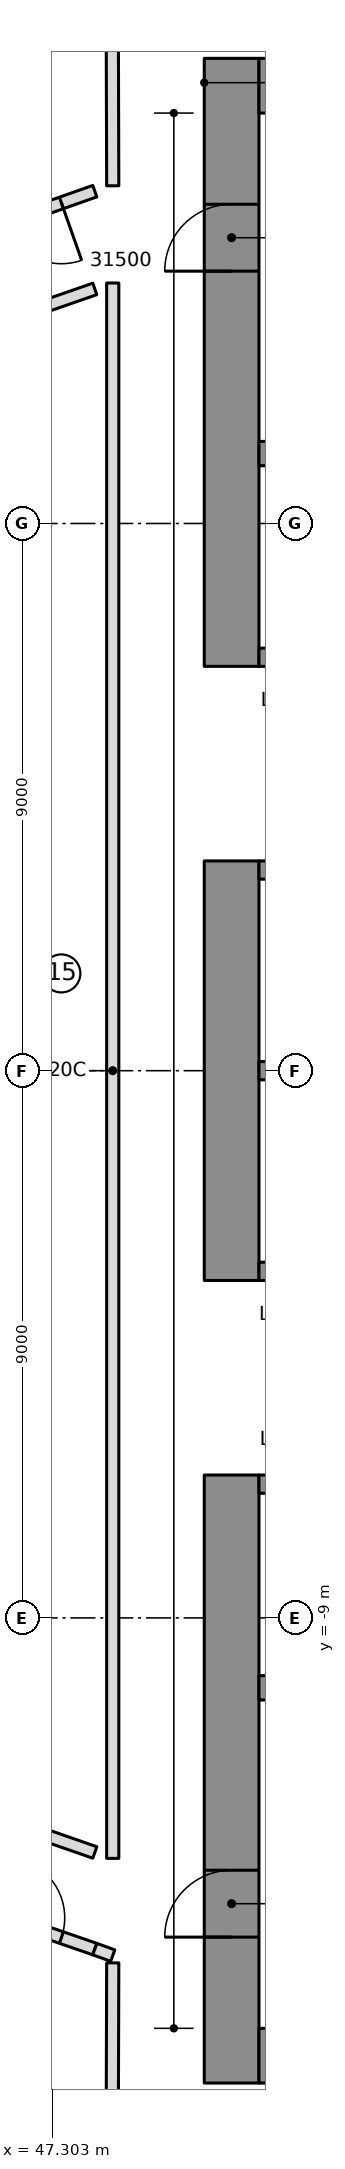
"""IFC4 building model, lengths in metres.
Left out: names, types, materials, properties, quantities, classifications, styles, units other than length and angle.
Written with IfcOpenShell. Run it as: python <this file> out.ifc"""

import sys

from ifc_helpers import new_model, si_unit, direction, frame, frame_2d, origin, place, context, subcontext, project, spatial, rectangle, extrude, element, fill, save


model = new_model("IFC4")
c1 = context("Model", 3, precision=1e-05, world=origin(), true_north=direction((0.0, 1.0)))
c2 = subcontext(c1, "Body", "Model", "MODEL_VIEW")
j1 = project(units=[si_unit("LENGTHUNIT", "METRE"), si_unit("PLANEANGLEUNIT", "RADIAN")], contexts=[c1])
p1 = place(None, origin())
s1 = spatial("IfcSite", under=j1, at=p1, CompositionType="ELEMENT")
p2 = place(p1, origin())
s2 = spatial("IfcBuilding", under=s1, at=p2, CompositionType="ELEMENT")
p3 = place(p2, frame((0.0, 0.0, 158.6)))
s3 = spatial("IfcBuildingStorey", under=s2, at=p3, CompositionType="ELEMENT", Elevation=158.6)
p4 = place(p3, frame((50.25, 6.65, 0.0), z_axis=(0.0, 0.0, 1.0), x_axis=(0.0, 1.0, 0.0)))
e1 = element("IfcWall", 1, at=p4, inside=s3, PredefinedType="SHEAR", context=c2, shape_type="SweptSolid", body=[
    extrude(rectangle(XDim=10.0, YDim=0.9, at=frame_2d((5.0, 0.0))), origin(), (0.0, 0.0, 1.0), 3.55),
])
p5 = place(p4, frame((6.5, 0.0, 0.0)))
e2 = element("IfcOpeningElement", 2, at=p5, cuts=e1, PredefinedType="OPENING", context=c2, shape_type="SweptSolid", body=[
    extrude(rectangle(XDim=1.1, YDim=2.1, at=frame_2d((0.55, 1.05))), frame((0.0, 0.46, 0.0), z_axis=(0.0, -1.0, 0.0), x_axis=(1.0, 0.0, 0.0)), (0.0, 0.0, 1.0), 0.92),
])
p6 = place(p3, frame((50.25, -3.45, 0.0), z_axis=(0.0, 0.0, 1.0), x_axis=(0.0, 1.0, 0.0)))
e3 = element("IfcWall", 3, at=p6, inside=s3, PredefinedType="SHEAR", context=c2, shape_type="SweptSolid", body=[
    extrude(rectangle(XDim=6.9, YDim=0.9, at=frame_2d((3.45, 0.0))), origin(), (0.0, 0.0, 1.0), 3.55),
])
p7 = place(p3, frame((50.25, -16.65, 0.0), z_axis=(0.0, 0.0, 1.0), x_axis=(0.0, 1.0, 0.0)))
e4 = element("IfcWall", 4, at=p7, inside=s3, PredefinedType="SHEAR", context=c2, shape_type="SweptSolid", body=[
    extrude(rectangle(XDim=10.0, YDim=0.9, at=frame_2d((5.0, 0.0))), origin(), (0.0, 0.0, 1.0), 3.55),
])
p8 = place(p7, frame((2.4, 0.0, 0.0)))
e5 = element("IfcOpeningElement", 5, at=p8, cuts=e4, PredefinedType="OPENING", context=c2, shape_type="SweptSolid", body=[
    extrude(rectangle(XDim=1.1, YDim=2.1, at=frame_2d((0.55, 1.05))), frame((0.0, 0.46, 0.0), z_axis=(0.0, -1.0, 0.0), x_axis=(1.0, 0.0, 0.0)), (0.0, 0.0, 1.0), 0.92),
])
for number, where, z_axis, x_axis in (
    (6, (50.7, 16.2, 0.0), (0.0, 0.0, 1.0), (1.0, 0.0, 0.0)),
    (7, (50.7, -16.2, 0.0), (0.0, 0.0, 1.0), (1.0, 0.0, 0.0)),
):
    element("IfcWall", number, at=place(p3, frame(where, z_axis=z_axis, x_axis=x_axis)), inside=s3, PredefinedType="SHEAR", context=c2, shape_type="SweptSolid", body=[
        extrude(rectangle(XDim=13.92, YDim=0.9, at=frame_2d((6.96, 0.0))), origin(), (0.0, 0.0, 1.0), 3.55),
    ])
p9 = place(p3, frame((50.7, 10.15, 0.0), z_axis=(0.0, 0.0, 1.0), x_axis=(1.0, 0.0, 0.0)))
e8 = element("IfcWall", 8, at=p9, inside=s3, PredefinedType="SHEAR", context=c2, shape_type="SweptSolid", body=[
    extrude(rectangle(XDim=13.02, YDim=0.4, at=frame_2d((6.51, 0.0))), origin(), (0.0, 0.0, 1.0), 3.55),
])
p10 = place(p9, frame((0.7, 0.0, 0.0)))
e9 = element("IfcOpeningElement", 9, at=p10, cuts=e8, PredefinedType="OPENING", context=c2, shape_type="SweptSolid", body=[
    extrude(rectangle(XDim=1.1, YDim=2.1, at=frame_2d((0.55, 1.05))), frame((0.0, 0.21, 0.0), z_axis=(0.0, -1.0, 0.0), x_axis=(1.0, 0.0, 0.0)), (0.0, 0.0, 1.0), 0.42),
])
p11 = place(p9, frame((3.5, 0.0, 0.0)))
e10 = element("IfcOpeningElement", 10, at=p11, cuts=e8, PredefinedType="OPENING", context=c2, shape_type="SweptSolid", body=[
    extrude(rectangle(XDim=1.1, YDim=2.1, at=frame_2d((0.55, 1.05))), frame((0.0, 0.21, 0.0), z_axis=(0.0, -1.0, 0.0), x_axis=(1.0, 0.0, 0.0)), (0.0, 0.0, 1.0), 0.42),
])
p12 = place(p3, frame((50.7, -10.15, 0.0), z_axis=(0.0, 0.0, 1.0), x_axis=(1.0, 0.0, 0.0)))
e11 = element("IfcWall", 11, at=p12, inside=s3, PredefinedType="SHEAR", context=c2, shape_type="SweptSolid", body=[
    extrude(rectangle(XDim=13.02, YDim=0.4, at=frame_2d((6.51, 0.0))), origin(), (0.0, 0.0, 1.0), 3.55),
])
p13 = place(p3, frame((50.7, 0.0, 0.0), z_axis=(0.0, 0.0, 1.0), x_axis=(1.0, 0.0, 0.0)))
e12 = element("IfcWall", 12, at=p13, inside=s3, PredefinedType="SHEAR", context=c2, shape_type="SweptSolid", body=[
    extrude(rectangle(XDim=10.9, YDim=0.3, at=frame_2d((5.45, 0.0))), origin(), (0.0, 0.0, 1.0), 3.55),
])
p14 = place(p3, frame((50.7, 3.3, 0.0), z_axis=(0.0, 0.0, 1.0), x_axis=(1.0, 0.0, 0.0)))
e13 = element("IfcWall", 13, at=p14, inside=s3, PredefinedType="SHEAR", context=c2, shape_type="SweptSolid", body=[
    extrude(rectangle(XDim=10.9, YDim=0.3, at=frame_2d((5.45, 0.0))), origin(), (0.0, 0.0, 1.0), 3.55),
])
p15 = place(p14, frame((0.8, 0.0, 0.0)))
e14 = element("IfcOpeningElement", 14, at=p15, cuts=e13, PredefinedType="OPENING", context=c2, shape_type="SweptSolid", body=[
    extrude(rectangle(XDim=0.9, YDim=2.1, at=frame_2d((0.45, 1.05))), frame((0.0, 0.16, 0.0), z_axis=(0.0, -1.0, 0.0), x_axis=(1.0, 0.0, 0.0)), (0.0, 0.0, 1.0), 0.32),
])
p16 = place(p14, frame((3.6, 0.0, 0.0)))
e15 = element("IfcOpeningElement", 15, at=p16, cuts=e13, PredefinedType="OPENING", context=c2, shape_type="SweptSolid", body=[
    extrude(rectangle(XDim=0.9, YDim=2.1, at=frame_2d((0.45, 1.05))), frame((0.0, 0.16, 0.0), z_axis=(0.0, -1.0, 0.0), x_axis=(1.0, 0.0, 0.0)), (0.0, 0.0, 1.0), 0.32),
])
p17 = place(p14, frame((6.4, 0.0, 0.0)))
e16 = element("IfcOpeningElement", 16, at=p17, cuts=e13, PredefinedType="OPENING", context=c2, shape_type="SweptSolid", body=[
    extrude(rectangle(XDim=0.9, YDim=2.1, at=frame_2d((0.45, 1.05))), frame((0.0, 0.16, 0.0), z_axis=(0.0, -1.0, 0.0), x_axis=(1.0, 0.0, 0.0)), (0.0, 0.0, 1.0), 0.32),
])
p18 = place(p14, frame((9.2, 0.0, 0.0)))
e17 = element("IfcOpeningElement", 17, at=p18, cuts=e13, PredefinedType="OPENING", context=c2, shape_type="SweptSolid", body=[
    extrude(rectangle(XDim=0.9, YDim=2.1, at=frame_2d((0.45, 1.05))), frame((0.0, 0.16, 0.0), z_axis=(0.0, -1.0, 0.0), x_axis=(1.0, 0.0, 0.0)), (0.0, 0.0, 1.0), 0.32),
])
p19 = place(p3, frame((50.7, 6.8, 0.0), z_axis=(0.0, 0.0, 1.0), x_axis=(1.0, 0.0, 0.0)))
e18 = element("IfcWall", 18, at=p19, inside=s3, PredefinedType="SHEAR", context=c2, shape_type="SweptSolid", body=[
    extrude(rectangle(XDim=10.9, YDim=0.3, at=frame_2d((5.45, 0.0))), origin(), (0.0, 0.0, 1.0), 3.55),
])
p20 = place(p19, frame((6.3, 0.0, 0.0)))
e19 = element("IfcOpeningElement", 19, at=p20, cuts=e18, PredefinedType="OPENING", context=c2, shape_type="SweptSolid", body=[
    extrude(rectangle(XDim=1.1, YDim=2.1, at=frame_2d((0.55, 1.05))), frame((0.0, 0.16, 0.0), z_axis=(0.0, -1.0, 0.0), x_axis=(1.0, 0.0, 0.0)), (0.0, 0.0, 1.0), 0.32),
])
p21 = place(p19, frame((9.1, 0.0, 0.0)))
e20 = element("IfcOpeningElement", 20, at=p21, cuts=e18, PredefinedType="OPENING", context=c2, shape_type="SweptSolid", body=[
    extrude(rectangle(XDim=1.1, YDim=2.1, at=frame_2d((0.55, 1.05))), frame((0.0, 0.16, 0.0), z_axis=(0.0, -1.0, 0.0), x_axis=(1.0, 0.0, 0.0)), (0.0, 0.0, 1.0), 0.32),
])
p22 = place(p3, frame((50.7, -3.3, 0.0), z_axis=(0.0, 0.0, 1.0), x_axis=(1.0, 0.0, 0.0)))
e21 = element("IfcWall", 21, at=p22, inside=s3, PredefinedType="SHEAR", context=c2, shape_type="SweptSolid", body=[
    extrude(rectangle(XDim=10.9, YDim=0.3, at=frame_2d((5.45, 0.0))), origin(), (0.0, 0.0, 1.0), 3.55),
])
p23 = place(p22, frame((9.2, 0.0, 0.0)))
e22 = element("IfcOpeningElement", 22, at=p23, cuts=e21, PredefinedType="OPENING", context=c2, shape_type="SweptSolid", body=[
    extrude(rectangle(XDim=0.9, YDim=2.1, at=frame_2d((0.45, 1.05))), frame((0.0, 0.16, 0.0), z_axis=(0.0, -1.0, 0.0), x_axis=(1.0, 0.0, 0.0)), (0.0, 0.0, 1.0), 0.32),
])
p24 = place(p3, frame((50.7, -6.8, 0.0), z_axis=(0.0, 0.0, 1.0), x_axis=(1.0, 0.0, 0.0)))
e23 = element("IfcWall", 23, at=p24, inside=s3, PredefinedType="SHEAR", context=c2, shape_type="SweptSolid", body=[
    extrude(rectangle(XDim=10.9, YDim=0.3, at=frame_2d((5.45, 0.0))), origin(), (0.0, 0.0, 1.0), 3.55),
])
p25 = place(p24, frame((0.7, 0.0, 0.0)))
e24 = element("IfcOpeningElement", 24, at=p25, cuts=e23, PredefinedType="OPENING", context=c2, shape_type="SweptSolid", body=[
    extrude(rectangle(XDim=1.1, YDim=2.1, at=frame_2d((0.55, 1.05))), frame((0.0, 0.16, 0.0), z_axis=(0.0, -1.0, 0.0), x_axis=(1.0, 0.0, 0.0)), (0.0, 0.0, 1.0), 0.32),
])
p26 = place(p24, frame((3.5, 0.0, 0.0)))
e25 = element("IfcOpeningElement", 25, at=p26, cuts=e23, PredefinedType="OPENING", context=c2, shape_type="SweptSolid", body=[
    extrude(rectangle(XDim=1.1, YDim=2.1, at=frame_2d((0.55, 1.05))), frame((0.0, 0.16, 0.0), z_axis=(0.0, -1.0, 0.0), x_axis=(1.0, 0.0, 0.0)), (0.0, 0.0, 1.0), 0.32),
])
p27 = place(p24, frame((6.3, 0.0, 0.0)))
e26 = element("IfcOpeningElement", 26, at=p27, cuts=e23, PredefinedType="OPENING", context=c2, shape_type="SweptSolid", body=[
    extrude(rectangle(XDim=1.1, YDim=2.1, at=frame_2d((0.55, 1.05))), frame((0.0, 0.16, 0.0), z_axis=(0.0, -1.0, 0.0), x_axis=(1.0, 0.0, 0.0)), (0.0, 0.0, 1.0), 0.32),
])
p28 = place(p24, frame((9.1, 0.0, 0.0)))
e27 = element("IfcOpeningElement", 27, at=p28, cuts=e23, PredefinedType="OPENING", context=c2, shape_type="SweptSolid", body=[
    extrude(rectangle(XDim=1.1, YDim=2.1, at=frame_2d((0.55, 1.05))), frame((0.0, 0.16, 0.0), z_axis=(0.0, -1.0, 0.0), x_axis=(1.0, 0.0, 0.0)), (0.0, 0.0, 1.0), 0.32),
])
p29 = place(p3, frame((48.0, 14.466, 0.0), z_axis=(0.0, 0.0, 1.0), x_axis=(-0.94307168041, -0.332589545248, 0.0)))
e28 = element("IfcWall", 28, at=p29, inside=s3, PredefinedType="PARTITIONING", context=c2, shape_type="SweptSolid", body=[
    extrude(rectangle(XDim=2.437, YDim=0.2, at=frame_2d((1.219, 0.0))), origin(), (0.0, 0.0, 1.0), 3.25),
])
p30 = place(p29, frame((0.582, 0.0, 0.0)))
e29 = element("IfcOpeningElement", 29, at=p30, cuts=e28, PredefinedType="OPENING", context=c2, shape_type="SweptSolid", body=[
    extrude(rectangle(XDim=1.0, YDim=2.1, at=frame_2d((0.5, 1.05))), frame((0.0, 0.11, 0.0), z_axis=(0.0, -1.0, 0.0), x_axis=(1.0, 0.0, 0.0)), (0.0, 0.0, 1.0), 0.22),
])
p31 = place(p3, frame((45.702, -13.655, 0.0), z_axis=(0.0, 0.0, 1.0), x_axis=(0.945472196346, -0.325702818435, 0.0)))
e30 = element("IfcWall", 30, at=p31, inside=s3, PredefinedType="PARTITIONING", context=c2, shape_type="SweptSolid", body=[
    extrude(rectangle(XDim=2.431, YDim=0.2, at=frame_2d((1.215, 0.0))), origin(), (0.0, 0.0, 1.0), 3.25),
])
p32 = place(p31, frame((0.85, 0.0, 0.0)))
e31 = element("IfcOpeningElement", 31, at=p32, cuts=e30, PredefinedType="OPENING", context=c2, shape_type="SweptSolid", body=[
    extrude(rectangle(XDim=1.0, YDim=2.1, at=frame_2d((0.5, 1.05))), frame((0.0, 0.11, 0.0), z_axis=(0.0, -1.0, 0.0), x_axis=(1.0, 0.0, 0.0)), (0.0, 0.0, 1.0), 0.22),
])
for number, where, z_axis, x_axis in (
    (32, (46.781, 12.434, 0.0), (0.0, 0.0, 1.0), (0.945, 0.328, 0.0)),
    (33, (48.0, -12.858, 0.0), (0.0, 0.0, 1.0), (-0.945, 0.328, 0.0)),
):
    element("IfcWall", number, at=place(p3, frame(where, z_axis=z_axis, x_axis=x_axis)), inside=s3, PredefinedType="PARTITIONING", context=c2, shape_type="SweptSolid", body=[
        extrude(rectangle(XDim=1.29, YDim=0.2, at=frame_2d((0.645, 0.0))), origin(), (0.0, 0.0, 1.0), 3.25),
    ])
p33 = place(p3, frame((48.295, 12.955, 0.0), z_axis=(0.0, 0.0, 1.0), x_axis=(0.0, -1.0, 0.0)))
e34 = element("IfcWall", 34, at=p33, inside=s3, PredefinedType="PARTITIONING", context=c2, shape_type="SweptSolid", body=[
    extrude(rectangle(XDim=25.91, YDim=0.2, at=frame_2d((12.955, 0.0))), origin(), (0.0, 0.0, 1.0), 3.25),
])
p34 = place(p3, frame((48.279, 20.289, 0.0), z_axis=(0.0, 0.0, 1.0), x_axis=(0.002809695168, -0.999996052799, 0.0)))
e35 = element("IfcWall", 35, at=p34, inside=s3, PredefinedType="PARTITIONING", context=c2, shape_type="SweptSolid", body=[
    extrude(rectangle(XDim=5.735, YDim=0.2, at=frame_2d((2.867, 0.0))), origin(), (0.0, 0.0, 1.0), 3.25),
])
p35 = place(p3, frame((48.0, -14.447, 0.0), z_axis=(0.0, 0.0, 1.0), x_axis=(0.940111128087, -0.3408681077, 0.0)))
e36 = element("IfcWall", 36, at=p35, inside=s3, PredefinedType="PARTITIONING", context=c2, shape_type="SweptSolid", body=[
    extrude(rectangle(XDim=0.314, YDim=0.2, at=frame_2d((0.157, 0.0))), origin(), (0.0, 0.0, 1.0), 3.25),
])
p36 = place(p3, frame((48.295, -14.674, 0.0), z_axis=(0.0, 0.0, 1.0), x_axis=(-0.00286967817, -0.999995882465, 0.0)))
e37 = element("IfcWall", 37, at=p36, inside=s3, PredefinedType="PARTITIONING", context=c2, shape_type="SweptSolid", body=[
    extrude(rectangle(XDim=5.615, YDim=0.2, at=frame_2d((2.808, 0.0))), origin(), (0.0, 0.0, 1.0), 3.25),
])
p37 = place(p30, origin())
e38 = element("IfcDoor", 38, at=p37, inside=s3, OperationType="SINGLE_SWING_LEFT", PredefinedType="DOOR", context=c2, shape_type="SweptSolid", body=[
    extrude(rectangle(XDim=1.0, YDim=2.1, at=frame_2d((0.5, 1.05))), frame((0.0, 0.025, 0.0), z_axis=(0.0, -1.0, 0.0), x_axis=(1.0, 0.0, 0.0)), (0.0, 0.0, 1.0), 0.05),
])
fill(e29, e38)
p38 = place(p32, origin())
e39 = element("IfcDoor", 39, at=p38, inside=s3, OperationType="SINGLE_SWING_LEFT", PredefinedType="DOOR", context=c2, shape_type="SweptSolid", body=[
    extrude(rectangle(XDim=1.0, YDim=2.1, at=frame_2d((0.5, 1.05))), frame((0.0, 0.025, 0.0), z_axis=(0.0, -1.0, 0.0), x_axis=(1.0, 0.0, 0.0)), (0.0, 0.0, 1.0), 0.05),
])
fill(e31, e39)
p39 = place(p5, origin())
e40 = element("IfcDoor", 40, at=p39, inside=s3, OperationType="SINGLE_SWING_RIGHT", PredefinedType="DOOR", context=c2, shape_type="SweptSolid", body=[
    extrude(rectangle(XDim=1.1, YDim=2.1, at=frame_2d((0.55, 1.05))), frame((0.0, 0.025, 0.0), z_axis=(0.0, -1.0, 0.0), x_axis=(1.0, 0.0, 0.0)), (0.0, 0.0, 1.0), 0.05),
])
fill(e2, e40)
p40 = place(p8, origin())
e41 = element("IfcDoor", 41, at=p40, inside=s3, OperationType="SINGLE_SWING_RIGHT", PredefinedType="DOOR", context=c2, shape_type="SweptSolid", body=[
    extrude(rectangle(XDim=1.1, YDim=2.1, at=frame_2d((0.55, 1.05))), frame((0.0, 0.025, 0.0), z_axis=(0.0, -1.0, 0.0), x_axis=(1.0, 0.0, 0.0)), (0.0, 0.0, 1.0), 0.05),
])
fill(e5, e41)
save(model, sys.argv[1])
